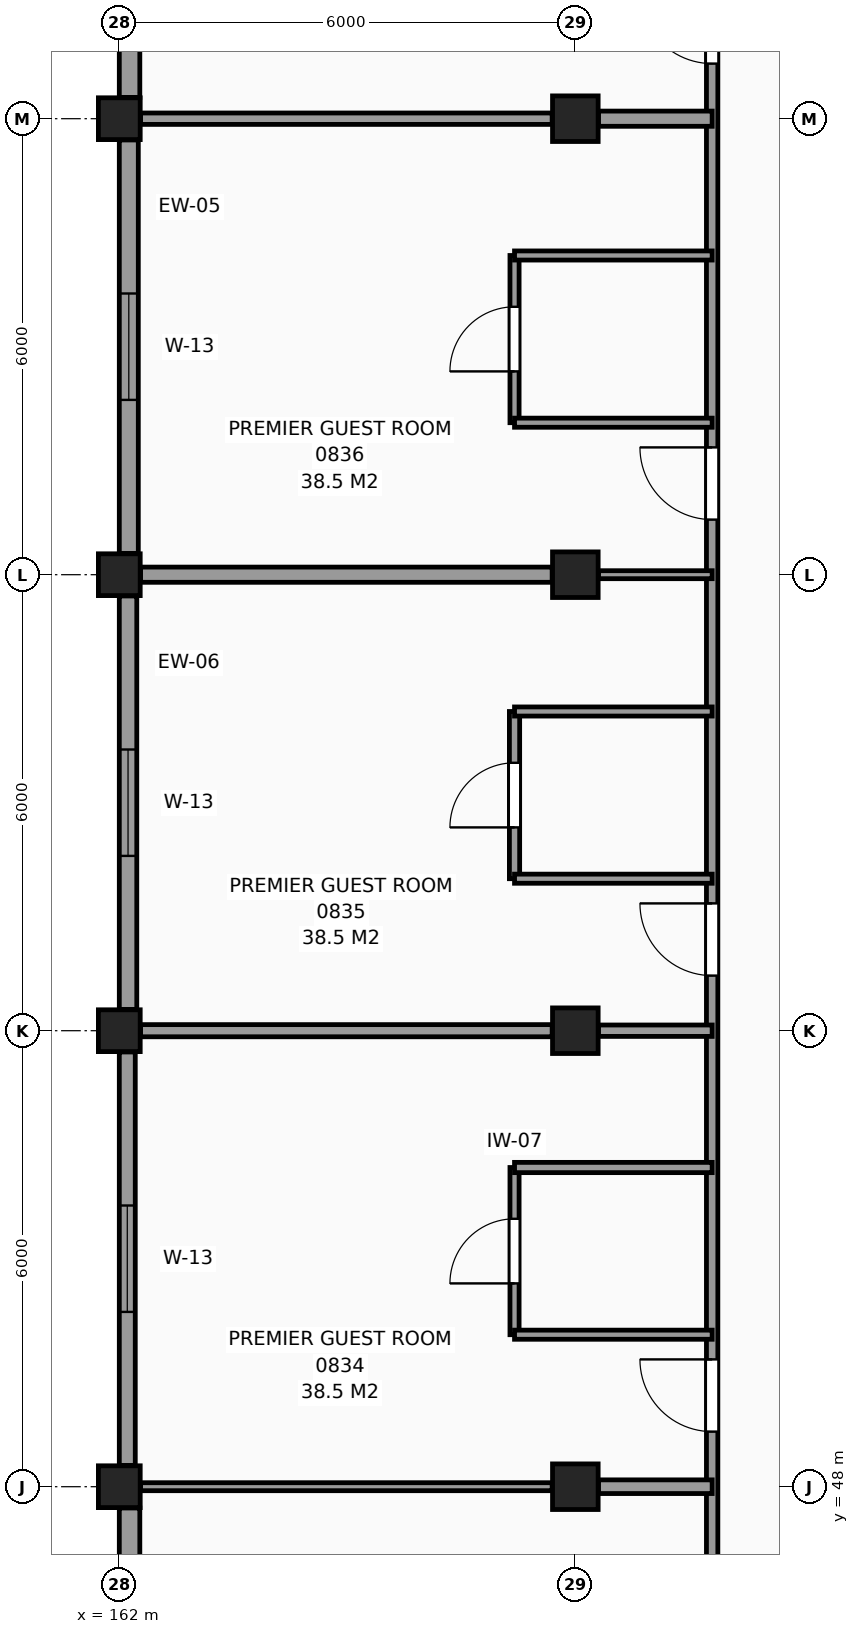
"""IFC4 building model, lengths in metres.
Left out: names, types, materials, properties, quantities, classifications, styles, units other than length and angle.
Written with IfcOpenShell. Run it as: python <this file> out.ifc"""

import sys

from ifc_helpers import new_model, si_unit, direction, frame, frame_2d, origin, origin_2d, place, context, subcontext, project, spatial, rectangle, extrude, element, fill, save


model = new_model("IFC4")
c1 = context("Model", 3, precision=1e-05, world=origin(), true_north=direction((0.0, 1.0)))
c2 = subcontext(c1, "Body", "Model", "MODEL_VIEW")
j1 = project(units=[si_unit("LENGTHUNIT", "METRE"), si_unit("PLANEANGLEUNIT", "RADIAN")], contexts=[c1])
p1 = place(None, origin())
s1 = spatial("IfcSite", under=j1, at=p1, CompositionType="ELEMENT")
p2 = place(p1, origin())
s2 = spatial("IfcBuilding", under=s1, at=p2, CompositionType="ELEMENT")
p3 = place(p2, frame((0.0, 0.0, 34.8)))
s3 = spatial("IfcBuildingStorey", under=s2, at=p3, CompositionType="ELEMENT", Elevation=34.8)
for number, where, z_axis, x_axis in (
    (1, (162.0, 48.0, 0.0), (0.0, 0.0, 1.0), (1.0, 0.0, 0.0)),
    (2, (162.0, 54.0, 0.0), (0.0, 0.0, 1.0), (1.0, 0.0, 0.0)),
    (3, (162.0, 60.0, 0.0), (0.0, 0.0, 1.0), (1.0, 0.0, 0.0)),
    (4, (162.0, 66.0, 0.0), (0.0, 0.0, 1.0), (1.0, 0.0, 0.0)),
):
    element("IfcColumn", number, at=place(p3, frame(where, z_axis=z_axis, x_axis=x_axis)), inside=s3, PredefinedType="COLUMN", context=c2, shape_type="SweptSolid", body=[
        extrude(rectangle(XDim=0.55, YDim=0.55, at=origin_2d()), origin(), (0.0, 0.0, 1.0), 3.3),
    ])
for number, where, z_axis, x_axis in (
    (5, (168.0, 48.0, 0.0), (0.0, 0.0, 1.0), (1.0, 0.0, 0.0)),
    (6, (168.0, 54.0, 0.0), (0.0, 0.0, 1.0), (1.0, 0.0, 0.0)),
    (7, (168.0, 60.0, 0.0), (0.0, 0.0, 1.0), (1.0, 0.0, 0.0)),
    (8, (168.0, 66.0, 0.0), (0.0, 0.0, 1.0), (1.0, 0.0, 0.0)),
):
    element("IfcColumn", number, at=place(p3, frame(where, z_axis=z_axis, x_axis=x_axis)), inside=s3, PredefinedType="COLUMN", context=c2, shape_type="SweptSolid", body=[
        extrude(rectangle(XDim=0.6, YDim=0.6, at=origin_2d()), origin(), (0.0, 0.0, 1.0), 3.3),
    ])
p4 = place(p3, frame((162.135, 71.72, 0.0), z_axis=(0.0, 0.0, 1.0), x_axis=(0.0, -1.0, 0.0)))
e9 = element("IfcWall", 9, at=p4, inside=s3, PredefinedType="SOLIDWALL", context=c2, shape_type="SweptSolid", body=[
    extrude(rectangle(XDim=5.44, YDim=0.27, at=frame_2d((2.72, 0.0))), origin(), (0.0, 0.0, 1.0), 2.42),
])
p5 = place(p4, frame((2.02, 0.0, 0.8)))
e10 = element("IfcOpeningElement", 10, at=p5, cuts=e9, PredefinedType="OPENING", context=c2, shape_type="SweptSolid", body=[
    extrude(rectangle(XDim=1.4, YDim=1.4, at=frame_2d((0.7, 0.7))), frame((0.0, 0.145, 0.0), z_axis=(0.0, -1.0, 0.0), x_axis=(1.0, 0.0, 0.0)), (0.0, 0.0, 1.0), 0.29),
])
p6 = place(p3, frame((162.125, 65.72, 0.0), z_axis=(0.0, 0.0, 1.0), x_axis=(0.0, -1.0, 0.0)))
e11 = element("IfcWall", 11, at=p6, inside=s3, PredefinedType="SOLIDWALL", context=c2, shape_type="SweptSolid", body=[
    extrude(rectangle(XDim=5.44, YDim=0.25, at=frame_2d((2.72, 0.0))), origin(), (0.0, 0.0, 1.0), 2.42),
])
p7 = place(p6, frame((2.02, 0.0, 0.8)))
e12 = element("IfcOpeningElement", 12, at=p7, cuts=e11, PredefinedType="OPENING", context=c2, shape_type="SweptSolid", body=[
    extrude(rectangle(XDim=1.4, YDim=1.4, at=frame_2d((0.7, 0.7))), frame((0.0, 0.135, 0.0), z_axis=(0.0, -1.0, 0.0), x_axis=(1.0, 0.0, 0.0)), (0.0, 0.0, 1.0), 0.27),
])
p8 = place(p3, frame((162.115, 59.72, 0.0), z_axis=(0.0, 0.0, 1.0), x_axis=(0.0, -1.0, 0.0)))
e13 = element("IfcWall", 13, at=p8, inside=s3, PredefinedType="SOLIDWALL", context=c2, shape_type="SweptSolid", body=[
    extrude(rectangle(XDim=5.44, YDim=0.23, at=frame_2d((2.72, 0.0))), origin(), (0.0, 0.0, 1.0), 2.42),
])
p9 = place(p8, frame((2.02, 0.0, 0.8)))
e14 = element("IfcOpeningElement", 14, at=p9, cuts=e13, PredefinedType="OPENING", context=c2, shape_type="SweptSolid", body=[
    extrude(rectangle(XDim=1.4, YDim=1.4, at=frame_2d((0.7, 0.7))), frame((0.0, 0.125, 0.0), z_axis=(0.0, -1.0, 0.0), x_axis=(1.0, 0.0, 0.0)), (0.0, 0.0, 1.0), 0.25),
])
p10 = place(p3, frame((162.105, 53.72, 0.0), z_axis=(0.0, 0.0, 1.0), x_axis=(0.0, -1.0, 0.0)))
e15 = element("IfcWall", 15, at=p10, inside=s3, PredefinedType="SOLIDWALL", context=c2, shape_type="SweptSolid", body=[
    extrude(rectangle(XDim=5.44, YDim=0.21, at=frame_2d((2.72, 0.0))), origin(), (0.0, 0.0, 1.0), 2.42),
])
p11 = place(p10, frame((2.02, 0.0, 0.8)))
e16 = element("IfcOpeningElement", 16, at=p11, cuts=e15, PredefinedType="OPENING", context=c2, shape_type="SweptSolid", body=[
    extrude(rectangle(XDim=1.4, YDim=1.4, at=frame_2d((0.7, 0.7))), frame((0.0, 0.115, 0.0), z_axis=(0.0, -1.0, 0.0), x_axis=(1.0, 0.0, 0.0)), (0.0, 0.0, 1.0), 0.23),
])
p12 = place(p3, frame((162.135, 47.72, 0.0), z_axis=(0.0, 0.0, 1.0), x_axis=(0.0, -1.0, 0.0)))
e17 = element("IfcWall", 17, at=p12, inside=s3, PredefinedType="SOLIDWALL", context=c2, shape_type="SweptSolid", body=[
    extrude(rectangle(XDim=5.44, YDim=0.27, at=frame_2d((2.72, 0.0))), origin(), (0.0, 0.0, 1.0), 2.42),
])
p13 = place(p12, frame((2.02, 0.0, 0.8)))
e18 = element("IfcOpeningElement", 18, at=p13, cuts=e17, PredefinedType="OPENING", context=c2, shape_type="SweptSolid", body=[
    extrude(rectangle(XDim=1.4, YDim=1.4, at=frame_2d((0.7, 0.7))), frame((0.0, 0.145, 0.0), z_axis=(0.0, -1.0, 0.0), x_axis=(1.0, 0.0, 0.0)), (0.0, 0.0, 1.0), 0.29),
])
p14 = place(p3, frame((167.2, 50.0, 0.0), z_axis=(0.0, 0.0, 1.0), x_axis=(0.0, 1.0, 0.0)))
e19 = element("IfcWall", 19, at=p14, inside=s3, PredefinedType="PARTITIONING", context=c2, shape_type="SweptSolid", body=[
    extrude(rectangle(XDim=2.2, YDim=0.12, at=frame_2d((1.1, 0.0))), origin(), (0.0, 0.0, 1.0), 3.07),
])
p15 = place(p14, frame((0.675, 0.0, 0.0)))
e20 = element("IfcOpeningElement", 20, at=p15, cuts=e19, PredefinedType="OPENING", context=c2, shape_type="SweptSolid", body=[
    extrude(rectangle(XDim=0.85, YDim=2.1, at=frame_2d((0.425, 1.05))), frame((0.0, 0.07, 0.0), z_axis=(0.0, -1.0, 0.0), x_axis=(1.0, 0.0, 0.0)), (0.0, 0.0, 1.0), 0.14),
])
p16 = place(p3, frame((167.2, 56.0, 0.0), z_axis=(0.0, 0.0, 1.0), x_axis=(0.0, 1.0, 0.0)))
e21 = element("IfcWall", 21, at=p16, inside=s3, PredefinedType="PARTITIONING", context=c2, shape_type="SweptSolid", body=[
    extrude(rectangle(XDim=2.2, YDim=0.135, at=frame_2d((1.1, 0.0))), origin(), (0.0, 0.0, 1.0), 3.07),
])
p17 = place(p16, frame((0.675, 0.0, 0.0)))
e22 = element("IfcOpeningElement", 22, at=p17, cuts=e21, PredefinedType="OPENING", context=c2, shape_type="SweptSolid", body=[
    extrude(rectangle(XDim=0.85, YDim=2.1, at=frame_2d((0.425, 1.05))), frame((0.0, 0.078, 0.0), z_axis=(0.0, -1.0, 0.0), x_axis=(1.0, 0.0, 0.0)), (0.0, 0.0, 1.0), 0.155),
])
p18 = place(p3, frame((167.2, 62.0, 0.0), z_axis=(0.0, 0.0, 1.0), x_axis=(0.0, 1.0, 0.0)))
e23 = element("IfcWall", 23, at=p18, inside=s3, PredefinedType="PARTITIONING", context=c2, shape_type="SweptSolid", body=[
    extrude(rectangle(XDim=2.2, YDim=0.12, at=frame_2d((1.1, 0.0))), origin(), (0.0, 0.0, 1.0), 3.07),
])
p19 = place(p18, frame((0.675, 0.0, 0.0)))
e24 = element("IfcOpeningElement", 24, at=p19, cuts=e23, PredefinedType="OPENING", context=c2, shape_type="SweptSolid", body=[
    extrude(rectangle(XDim=0.85, YDim=2.1, at=frame_2d((0.425, 1.05))), frame((0.0, 0.07, 0.0), z_axis=(0.0, -1.0, 0.0), x_axis=(1.0, 0.0, 0.0)), (0.0, 0.0, 1.0), 0.14),
])
p20 = place(p3, frame((169.8, 42.235, 0.0), z_axis=(0.0, 0.0, 1.0), x_axis=(0.0, 1.0, 0.0)))
e25 = element("IfcWall", 25, at=p20, inside=s3, PredefinedType="PARTITIONING", context=c2, shape_type="SweptSolid", body=[
    extrude(rectangle(XDim=65.585, YDim=0.15, at=frame_2d((32.792, 0.0))), origin(), (0.0, 0.0, 1.0), 3.07),
])
p21 = place(p20, frame((50.165, 0.0, 0.0)))
e26 = element("IfcOpeningElement", 26, at=p21, cuts=e25, PredefinedType="OPENING", context=c2, shape_type="SweptSolid", body=[
    extrude(rectangle(XDim=1.2, YDim=2.2, at=frame_2d((0.6, 1.1))), frame((0.0, 0.085, 0.0), z_axis=(0.0, -1.0, 0.0), x_axis=(1.0, 0.0, 0.0)), (0.0, 0.0, 1.0), 0.17),
])
p22 = place(p20, frame((0.44, 0.0, 0.0)))
e27 = element("IfcOpeningElement", 27, at=p22, cuts=e25, PredefinedType="OPENING", context=c2, shape_type="SweptSolid", body=[
    extrude(rectangle(XDim=0.95, YDim=2.1, at=frame_2d((0.475, 1.05))), frame((0.0, 0.085, 0.0), z_axis=(0.0, -1.0, 0.0), x_axis=(1.0, 0.0, 0.0)), (0.0, 0.0, 1.0), 0.17),
])
p23 = place(p20, frame((6.49, 0.0, 0.0)))
e28 = element("IfcOpeningElement", 28, at=p23, cuts=e25, PredefinedType="OPENING", context=c2, shape_type="SweptSolid", body=[
    extrude(rectangle(XDim=0.95, YDim=2.1, at=frame_2d((0.475, 1.05))), frame((0.0, 0.085, 0.0), z_axis=(0.0, -1.0, 0.0), x_axis=(1.0, 0.0, 0.0)), (0.0, 0.0, 1.0), 0.17),
])
p24 = place(p20, frame((12.49, 0.0, 0.0)))
e29 = element("IfcOpeningElement", 29, at=p24, cuts=e25, PredefinedType="OPENING", context=c2, shape_type="SweptSolid", body=[
    extrude(rectangle(XDim=0.95, YDim=2.1, at=frame_2d((0.475, 1.05))), frame((0.0, 0.085, 0.0), z_axis=(0.0, -1.0, 0.0), x_axis=(1.0, 0.0, 0.0)), (0.0, 0.0, 1.0), 0.17),
])
p25 = place(p20, frame((18.49, 0.0, 0.0)))
e30 = element("IfcOpeningElement", 30, at=p25, cuts=e25, PredefinedType="OPENING", context=c2, shape_type="SweptSolid", body=[
    extrude(rectangle(XDim=0.95, YDim=2.1, at=frame_2d((0.475, 1.05))), frame((0.0, 0.085, 0.0), z_axis=(0.0, -1.0, 0.0), x_axis=(1.0, 0.0, 0.0)), (0.0, 0.0, 1.0), 0.17),
])
p26 = place(p20, frame((24.49, 0.0, 0.0)))
e31 = element("IfcOpeningElement", 31, at=p26, cuts=e25, PredefinedType="OPENING", context=c2, shape_type="SweptSolid", body=[
    extrude(rectangle(XDim=0.95, YDim=2.1, at=frame_2d((0.475, 1.05))), frame((0.0, 0.085, 0.0), z_axis=(0.0, -1.0, 0.0), x_axis=(1.0, 0.0, 0.0)), (0.0, 0.0, 1.0), 0.17),
])
p27 = place(p20, frame((30.49, 0.0, 0.0)))
e32 = element("IfcOpeningElement", 32, at=p27, cuts=e25, PredefinedType="OPENING", context=c2, shape_type="SweptSolid", body=[
    extrude(rectangle(XDim=0.95, YDim=2.1, at=frame_2d((0.475, 1.05))), frame((0.0, 0.085, 0.0), z_axis=(0.0, -1.0, 0.0), x_axis=(1.0, 0.0, 0.0)), (0.0, 0.0, 1.0), 0.17),
])
p28 = place(p20, frame((54.49, 0.0, 0.0)))
e33 = element("IfcOpeningElement", 33, at=p28, cuts=e25, PredefinedType="OPENING", context=c2, shape_type="SweptSolid", body=[
    extrude(rectangle(XDim=0.95, YDim=2.1, at=frame_2d((0.475, 1.05))), frame((0.0, 0.085, 0.0), z_axis=(0.0, -1.0, 0.0), x_axis=(1.0, 0.0, 0.0)), (0.0, 0.0, 1.0), 0.17),
])
p29 = place(p20, frame((60.49, 0.0, 0.0)))
e34 = element("IfcOpeningElement", 34, at=p29, cuts=e25, PredefinedType="OPENING", context=c2, shape_type="SweptSolid", body=[
    extrude(rectangle(XDim=0.95, YDim=2.1, at=frame_2d((0.475, 1.05))), frame((0.0, 0.085, 0.0), z_axis=(0.0, -1.0, 0.0), x_axis=(1.0, 0.0, 0.0)), (0.0, 0.0, 1.0), 0.17),
])
p30 = place(p3, frame((162.28, 48.0, 0.0), z_axis=(0.0, 0.0, 1.0), x_axis=(1.0, 0.0, 0.0)))
e35 = element("IfcWall", 35, at=p30, inside=s3, PredefinedType="PARTITIONING", context=c2, shape_type="SweptSolid", body=[
    extrude(rectangle(XDim=5.415, YDim=0.105, at=frame_2d((2.708, 0.0))), origin(), (0.0, 0.0, 1.0), 2.37),
])
p31 = place(p3, frame((168.305, 48.0, 0.0), z_axis=(0.0, 0.0, 1.0), x_axis=(1.0, 0.0, 0.0)))
e36 = element("IfcWall", 36, at=p31, inside=s3, PredefinedType="PARTITIONING", context=c2, shape_type="SweptSolid", body=[
    extrude(rectangle(XDim=1.495, YDim=0.18, at=frame_2d((0.748, 0.0))), origin(), (0.0, 0.0, 1.0), 2.47),
])
p32 = place(p3, frame((167.2, 50.0, 0.0), z_axis=(0.0, 0.0, 1.0), x_axis=(1.0, 0.0, 0.0)))
e37 = element("IfcWall", 37, at=p32, inside=s3, PredefinedType="PARTITIONING", context=c2, shape_type="SweptSolid", body=[
    extrude(rectangle(XDim=2.6, YDim=0.12, at=frame_2d((1.3, 0.0))), origin(), (0.0, 0.0, 1.0), 3.07),
])
p33 = place(p3, frame((167.2, 52.2, 0.0), z_axis=(0.0, 0.0, 1.0), x_axis=(1.0, 0.0, 0.0)))
e38 = element("IfcWall", 38, at=p33, inside=s3, PredefinedType="PARTITIONING", context=c2, shape_type="SweptSolid", body=[
    extrude(rectangle(XDim=2.6, YDim=0.135, at=frame_2d((1.3, 0.0))), origin(), (0.0, 0.0, 1.0), 3.07),
])
p34 = place(p3, frame((162.28, 54.0, 0.0), z_axis=(0.0, 0.0, 1.0), x_axis=(1.0, 0.0, 0.0)))
e39 = element("IfcWall", 39, at=p34, inside=s3, PredefinedType="PARTITIONING", context=c2, shape_type="SweptSolid", body=[
    extrude(rectangle(XDim=5.415, YDim=0.16, at=frame_2d((2.708, 0.0))), origin(), (0.0, 0.0, 1.0), 2.27),
])
p35 = place(p3, frame((168.305, 54.0, 0.0), z_axis=(0.0, 0.0, 1.0), x_axis=(1.0, 0.0, 0.0)))
e40 = element("IfcWall", 40, at=p35, inside=s3, PredefinedType="PARTITIONING", context=c2, shape_type="SweptSolid", body=[
    extrude(rectangle(XDim=1.495, YDim=0.15, at=frame_2d((0.748, 0.0))), origin(), (0.0, 0.0, 1.0), 2.27),
])
for number, where, z_axis, x_axis in (
    (41, (167.2, 56.0, 0.0), (0.0, 0.0, 1.0), (1.0, 0.0, 0.0)),
    (42, (167.2, 58.2, 0.0), (0.0, 0.0, 1.0), (1.0, 0.0, 0.0)),
):
    element("IfcWall", number, at=place(p3, frame(where, z_axis=z_axis, x_axis=x_axis)), inside=s3, PredefinedType="PARTITIONING", context=c2, shape_type="SweptSolid", body=[
        extrude(rectangle(XDim=2.6, YDim=0.12, at=frame_2d((1.3, 0.0))), origin(), (0.0, 0.0, 1.0), 3.07),
    ])
p36 = place(p3, frame((162.28, 60.0, 0.0), z_axis=(0.0, 0.0, 1.0), x_axis=(1.0, 0.0, 0.0)))
e43 = element("IfcWall", 43, at=p36, inside=s3, PredefinedType="PARTITIONING", context=c2, shape_type="SweptSolid", body=[
    extrude(rectangle(XDim=5.415, YDim=0.2, at=frame_2d((2.708, 0.0))), origin(), (0.0, 0.0, 1.0), 2.27),
])
p37 = place(p3, frame((168.305, 60.0, 0.0), z_axis=(0.0, 0.0, 1.0), x_axis=(1.0, 0.0, 0.0)))
e44 = element("IfcWall", 44, at=p37, inside=s3, PredefinedType="PARTITIONING", context=c2, shape_type="SweptSolid", body=[
    extrude(rectangle(XDim=1.495, YDim=0.105, at=frame_2d((0.748, 0.0))), origin(), (0.0, 0.0, 1.0), 2.27),
])
for number, where, z_axis, x_axis in (
    (45, (167.2, 62.0, 0.0), (0.0, 0.0, 1.0), (1.0, 0.0, 0.0)),
    (46, (167.2, 64.2, 0.0), (0.0, 0.0, 1.0), (1.0, 0.0, 0.0)),
):
    element("IfcWall", number, at=place(p3, frame(where, z_axis=z_axis, x_axis=x_axis)), inside=s3, PredefinedType="PARTITIONING", context=c2, shape_type="SweptSolid", body=[
        extrude(rectangle(XDim=2.6, YDim=0.12, at=frame_2d((1.3, 0.0))), origin(), (0.0, 0.0, 1.0), 3.07),
    ])
p38 = place(p3, frame((162.28, 66.0, 0.0), z_axis=(0.0, 0.0, 1.0), x_axis=(1.0, 0.0, 0.0)))
e47 = element("IfcWall", 47, at=p38, inside=s3, PredefinedType="PARTITIONING", context=c2, shape_type="SweptSolid", body=[
    extrude(rectangle(XDim=5.415, YDim=0.15, at=frame_2d((2.708, 0.0))), origin(), (0.0, 0.0, 1.0), 2.27),
])
p39 = place(p3, frame((168.305, 66.0, 0.0), z_axis=(0.0, 0.0, 1.0), x_axis=(1.0, 0.0, 0.0)))
e48 = element("IfcWall", 48, at=p39, inside=s3, PredefinedType="PARTITIONING", context=c2, shape_type="SweptSolid", body=[
    extrude(rectangle(XDim=1.495, YDim=0.2, at=frame_2d((0.748, 0.0))), origin(), (0.0, 0.0, 1.0), 2.27),
])
p40 = place(p11, origin())
e49 = element("IfcWindow", 49, at=p40, inside=s3, PartitioningType="SINGLE_PANEL", PredefinedType="WINDOW", context=c2, shape_type="SweptSolid", body=[
    extrude(rectangle(XDim=1.4, YDim=1.4, at=frame_2d((0.7, 0.7))), frame((0.0, 0.03, 0.0), z_axis=(0.0, -1.0, 0.0), x_axis=(1.0, 0.0, 0.0)), (0.0, 0.0, 1.0), 0.06),
])
fill(e16, e49)
p41 = place(p9, origin())
e50 = element("IfcWindow", 50, at=p41, inside=s3, PartitioningType="SINGLE_PANEL", PredefinedType="WINDOW", context=c2, shape_type="SweptSolid", body=[
    extrude(rectangle(XDim=1.4, YDim=1.4, at=frame_2d((0.7, 0.7))), frame((0.0, 0.03, 0.0), z_axis=(0.0, -1.0, 0.0), x_axis=(1.0, 0.0, 0.0)), (0.0, 0.0, 1.0), 0.06),
])
fill(e14, e50)
p42 = place(p7, origin())
e51 = element("IfcWindow", 51, at=p42, inside=s3, PartitioningType="SINGLE_PANEL", PredefinedType="WINDOW", context=c2, shape_type="SweptSolid", body=[
    extrude(rectangle(XDim=1.4, YDim=1.4, at=frame_2d((0.7, 0.7))), frame((0.0, 0.03, 0.0), z_axis=(0.0, -1.0, 0.0), x_axis=(1.0, 0.0, 0.0)), (0.0, 0.0, 1.0), 0.06),
])
fill(e12, e51)
p43 = place(p15, origin())
e52 = element("IfcDoor", 52, at=p43, inside=s3, OperationType="SINGLE_SWING_LEFT", PredefinedType="DOOR", context=c2, shape_type="SweptSolid", body=[
    extrude(rectangle(XDim=0.85, YDim=2.1, at=frame_2d((0.425, 1.05))), frame((0.0, 0.025, 0.0), z_axis=(0.0, -1.0, 0.0), x_axis=(1.0, 0.0, 0.0)), (0.0, 0.0, 1.0), 0.05),
])
fill(e20, e52)
p44 = place(p23, origin())
e53 = element("IfcDoor", 53, at=p44, inside=s3, OperationType="SINGLE_SWING_RIGHT", PredefinedType="DOOR", context=c2, shape_type="SweptSolid", body=[
    extrude(rectangle(XDim=0.95, YDim=2.1, at=frame_2d((0.475, 1.05))), frame((0.0, 0.025, 0.0), z_axis=(0.0, -1.0, 0.0), x_axis=(1.0, 0.0, 0.0)), (0.0, 0.0, 1.0), 0.05),
])
fill(e28, e53)
p45 = place(p17, origin())
e54 = element("IfcDoor", 54, at=p45, inside=s3, OperationType="SINGLE_SWING_LEFT", PredefinedType="DOOR", context=c2, shape_type="SweptSolid", body=[
    extrude(rectangle(XDim=0.85, YDim=2.1, at=frame_2d((0.425, 1.05))), frame((0.0, 0.025, 0.0), z_axis=(0.0, -1.0, 0.0), x_axis=(1.0, 0.0, 0.0)), (0.0, 0.0, 1.0), 0.05),
])
fill(e22, e54)
p46 = place(p24, origin())
e55 = element("IfcDoor", 55, at=p46, inside=s3, OperationType="SINGLE_SWING_RIGHT", PredefinedType="DOOR", context=c2, shape_type="SweptSolid", body=[
    extrude(rectangle(XDim=0.95, YDim=2.1, at=frame_2d((0.475, 1.05))), frame((0.0, 0.025, 0.0), z_axis=(0.0, -1.0, 0.0), x_axis=(1.0, 0.0, 0.0)), (0.0, 0.0, 1.0), 0.05),
])
fill(e29, e55)
p47 = place(p19, origin())
e56 = element("IfcDoor", 56, at=p47, inside=s3, OperationType="SINGLE_SWING_LEFT", PredefinedType="DOOR", context=c2, shape_type="SweptSolid", body=[
    extrude(rectangle(XDim=0.85, YDim=2.1, at=frame_2d((0.425, 1.05))), frame((0.0, 0.025, 0.0), z_axis=(0.0, -1.0, 0.0), x_axis=(1.0, 0.0, 0.0)), (0.0, 0.0, 1.0), 0.05),
])
fill(e24, e56)
p48 = place(p25, origin())
e57 = element("IfcDoor", 57, at=p48, inside=s3, OperationType="SINGLE_SWING_RIGHT", PredefinedType="DOOR", context=c2, shape_type="SweptSolid", body=[
    extrude(rectangle(XDim=0.95, YDim=2.1, at=frame_2d((0.475, 1.05))), frame((0.0, 0.025, 0.0), z_axis=(0.0, -1.0, 0.0), x_axis=(1.0, 0.0, 0.0)), (0.0, 0.0, 1.0), 0.05),
])
fill(e30, e57)
p49 = place(p26, origin())
e58 = element("IfcDoor", 58, at=p49, inside=s3, OperationType="SINGLE_SWING_RIGHT", PredefinedType="DOOR", context=c2, shape_type="SweptSolid", body=[
    extrude(rectangle(XDim=0.95, YDim=2.1, at=frame_2d((0.475, 1.05))), frame((0.0, 0.025, 0.0), z_axis=(0.0, -1.0, 0.0), x_axis=(1.0, 0.0, 0.0)), (0.0, 0.0, 1.0), 0.05),
])
fill(e31, e58)
save(model, sys.argv[1])
